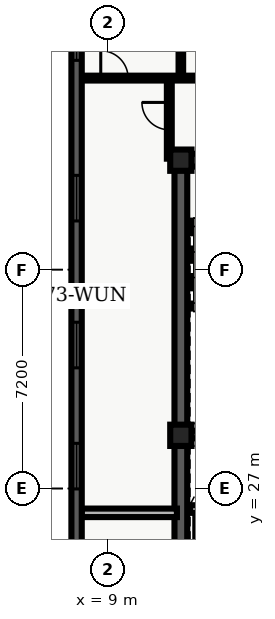
"""IFC4 building model, lengths in metres.
Left out: names, types, materials, properties, quantities, classifications, styles, units other than length and angle.
Written with IfcOpenShell. Run it as: python <this file> out.ifc"""

import sys

from ifc_helpers import new_model, entity, si_unit, converted_unit, direction, frame, origin_with_axes, origin_2d_with_axis, place, context, subcontext, project, spatial, polyline, rectangle, outline, extrude, element, fill, save


model = new_model("IFC4")
c1 = context("Model", 3, precision=1e-05, world=origin_with_axes(), true_north=direction((0.0, 1.0)))
c2 = subcontext(c1, "Body", "Model", "MODEL_VIEW")
j1 = project(units=[si_unit("LENGTHUNIT", "METRE"), converted_unit("PLANEANGLEUNIT", "DEGREE", entity("IfcPlaneAngleMeasure", 0.017), si_unit("PLANEANGLEUNIT", "RADIAN"), dimensions=[0, 0, 0, 0, 0, 0, 0])], contexts=[c1])
p1 = place(None, origin_with_axes())
s1 = spatial("IfcSite", under=j1, at=p1, CompositionType="ELEMENT")
p2 = place(p1, origin_with_axes())
s2 = spatial("IfcBuilding", under=s1, at=p2, CompositionType="ELEMENT")
p3 = place(p2, frame((0.0, 0.0, 295.8), z_axis=(0.0, 0.0, 1.0), x_axis=(1.0, 0.0, 0.0)))
s3 = spatial("IfcBuildingStorey", under=s2, at=p3, CompositionType="ELEMENT", Elevation=295.8)
p4 = place(p3, frame((11.4, 10.8, 0.0), z_axis=(0.0, 0.0, 1.0), x_axis=(0.0, 1.0, 0.0)))
e1 = element("IfcWall", 1, at=p4, inside=s3, PredefinedType="SHEAR", context=c2, shape_type="SweptSolid", body=[
    extrude(outline(polyline([(0.0, -0.21), (27.0, -0.21), (27.0, 0.21), (0.0, 0.21), (0.0, -0.21)])), origin_with_axes(), (0.0, 0.0, 1.0), 3.66),
])
p5 = place(p3, frame((11.4, 37.8, 0.0), z_axis=(0.0, 0.0, 1.0), x_axis=(1.0, 0.0, 0.0)))
e2 = element("IfcWall", 2, at=p5, inside=s3, PredefinedType="SHEAR", context=c2, shape_type="SweptSolid", body=[
    extrude(outline(polyline([(0.0, -0.21), (7.2, -0.21), (7.2, 0.21), (0.0, 0.21), (0.0, -0.21)])), origin_with_axes(), (0.0, 0.0, 1.0), 3.66),
])
p6 = place(p5, frame((2.625, 0.0, 0.0), z_axis=(0.0, 0.0, 1.0), x_axis=(1.0, 0.0, 0.0)))
e3 = element("IfcOpeningElement", 3, at=p6, cuts=e2, PredefinedType="OPENING", context=c2, shape_type="SweptSolid", body=[
    extrude(rectangle(XDim=1.05, YDim=0.44, at=origin_2d_with_axis()), origin_with_axes(), (0.0, 0.0, 1.0), 2.15),
])
p7 = place(p3, frame((11.61, 28.775, 0.0), z_axis=(0.0, 0.0, 1.0), x_axis=(1.0, 0.0, 0.0)))
e4 = element("IfcWall", 4, at=p7, inside=s3, PredefinedType="SHEAR", context=c2, shape_type="SweptSolid", body=[
    extrude(outline(polyline([(0.0, -0.125), (6.78, -0.125), (6.78, 0.125), (0.0, 0.125), (0.0, -0.125)])), origin_with_axes(), (0.0, 0.0, 1.0), 3.66),
])
p8 = place(p3, frame((11.7, 26.325, 0.0), z_axis=(0.0, 0.0, 1.0), x_axis=(1.0, 0.0, 0.0)))
e5 = element("IfcWall", 5, at=p8, inside=s3, PredefinedType="SOLIDWALL", context=c2, shape_type="SweptSolid", body=[
    extrude(outline(polyline([(0.0, -0.125), (6.6, -0.125), (6.6, 0.125), (0.0, 0.125), (0.0, -0.125)])), origin_with_axes(), (0.0, 0.0, 1.0), 2.7),
])
p9 = place(p8, frame((3.5, 0.0, 0.0), z_axis=(0.0, 0.0, 1.0), x_axis=(1.0, 0.0, 0.0)))
e6 = element("IfcOpeningElement", 6, at=p9, cuts=e5, PredefinedType="OPENING", context=c2, shape_type="SweptSolid", body=[
    extrude(rectangle(XDim=0.9, YDim=0.27, at=origin_2d_with_axis()), origin_with_axes(), (0.0, 0.0, 1.0), 2.15),
])
for number, where, z_axis, x_axis in (
    (7, (11.4, 28.75, 0.0), (0.0, 0.0, 1.0), (1.0, 0.0, 0.0)),
    (8, (11.4, 37.8, 0.0), (0.0, 0.0, 1.0), (1.0, 0.0, 0.0)),
):
    element("IfcColumn", number, at=place(p3, frame(where, z_axis=z_axis, x_axis=x_axis)), inside=s3, PredefinedType="COLUMN", context=c2, shape_type="SweptSolid", body=[
        extrude(rectangle(XDim=0.7, YDim=0.7, at=origin_2d_with_axis()), origin_with_axes(), (0.0, 0.0, 1.0), 3.9),
    ])
p10 = place(p3, frame((8.135, 40.5, 0.0), z_axis=(0.0, 0.0, 1.0), x_axis=(1.0, 0.0, 0.0)))
e9 = element("IfcWall", 9, at=p10, inside=s3, PredefinedType="PARTITIONING", context=c2, shape_type="SweptSolid", body=[
    extrude(outline(polyline([(0.0, -0.08), (22.715, -0.08), (22.715, 0.08), (0.0, 0.08), (0.0, -0.08)])), origin_with_axes(), (0.0, 0.0, 1.0), 2.7),
])
p11 = place(p10, frame((1.08, 0.0, 0.0), z_axis=(0.0, 0.0, 1.0), x_axis=(1.0, 0.0, 0.0)))
e10 = element("IfcOpeningElement", 10, at=p11, cuts=e9, PredefinedType="OPENING", context=c2, shape_type="SweptSolid", body=[
    extrude(rectangle(XDim=0.9, YDim=0.18, at=origin_2d_with_axis()), origin_with_axes(), (0.0, 0.0, 1.0), 2.15),
])
p12 = place(p10, frame((4.958, 0.0, 0.0), z_axis=(0.0, 0.0, 1.0), x_axis=(1.0, 0.0, 0.0)))
e11 = element("IfcOpeningElement", 11, at=p12, cuts=e9, PredefinedType="OPENING", context=c2, shape_type="SweptSolid", body=[
    extrude(rectangle(XDim=1.0, YDim=0.18, at=origin_2d_with_axis()), origin_with_axes(), (0.0, 0.0, 1.0), 2.15),
])
p13 = place(p10, frame((8.63, 0.0, 0.0), z_axis=(0.0, 0.0, 1.0), x_axis=(1.0, 0.0, 0.0)))
e12 = element("IfcOpeningElement", 12, at=p13, cuts=e9, PredefinedType="OPENING", context=c2, shape_type="SweptSolid", body=[
    extrude(rectangle(XDim=1.0, YDim=0.18, at=origin_2d_with_axis()), origin_with_axes(), (0.0, 0.0, 1.0), 2.15),
])
p14 = place(p10, frame((13.151, 0.0, 0.0), z_axis=(0.0, 0.0, 1.0), x_axis=(1.0, 0.0, 0.0)))
e13 = element("IfcOpeningElement", 13, at=p14, cuts=e9, PredefinedType="OPENING", context=c2, shape_type="SweptSolid", body=[
    extrude(rectangle(XDim=1.0, YDim=0.18, at=origin_2d_with_axis()), origin_with_axes(), (0.0, 0.0, 1.0), 2.15),
])
p15 = place(p3, frame((11.02, 37.85, 0.0), z_axis=(0.0, 0.0, 1.0), x_axis=(0.0, 1.0, 0.0)))
e14 = element("IfcWall", 14, at=p15, inside=s3, PredefinedType="PARTITIONING", context=c2, shape_type="SweptSolid", body=[
    extrude(outline(polyline([(0.0, -0.08), (2.65, -0.08), (2.65, 0.08), (0.0, 0.08), (0.0, -0.08)])), origin_with_axes(), (0.0, 0.0, 1.0), 2.7),
])
p16 = place(p15, frame((1.4, 0.0, 0.0), z_axis=(0.0, 0.0, 1.0), x_axis=(1.0, 0.0, 0.0)))
e15 = element("IfcOpeningElement", 15, at=p16, cuts=e14, PredefinedType="OPENING", context=c2, shape_type="SweptSolid", body=[
    extrude(rectangle(XDim=0.9, YDim=0.18, at=origin_2d_with_axis()), origin_with_axes(), (0.0, 0.0, 1.0), 2.15),
])
p17 = place(p3, frame((8.135, 26.2, 0.0), z_axis=(0.0, 0.0, 1.0), x_axis=(1.0, 0.0, 0.0)))
e16 = element("IfcWall", 16, at=p17, inside=s3, PredefinedType="PARTITIONING", context=c2, shape_type="SweptSolid", body=[
    extrude(outline(polyline([(0.0, -0.14), (3.135, -0.14), (3.135, 0.14), (0.0, 0.14), (0.0, -0.14)])), origin_with_axes(), (0.0, 0.0, 1.0), 2.7),
])
p18 = place(p3, frame((11.4, 40.6, 0.0), z_axis=(0.0, 0.0, 1.0), x_axis=(0.0, 1.0, 0.0)))
e17 = element("IfcWall", 17, at=p18, inside=s3, PredefinedType="PARTITIONING", context=c2, shape_type="SweptSolid", body=[
    extrude(outline(polyline([(0.0, -0.075), (5.865, -0.075), (5.865, 0.075), (0.0, 0.075), (0.0, -0.075)])), origin_with_axes(), (0.0, 0.0, 1.0), 2.7),
])
p19 = place(p3, frame((7.97, 4.54, 0.0), z_axis=(0.0, 0.0, 1.0), x_axis=(0.0, 1.0, 0.0)))
e18 = element("IfcWall", 18, at=p19, inside=s3, PredefinedType="SOLIDWALL", context=c2, shape_type="SweptSolid", body=[
    extrude(outline(polyline([(0.0, -0.17), (39.86, -0.17), (39.86, 0.17), (0.0, 0.17), (0.0, -0.17)])), origin_with_axes(), (0.0, 0.0, 1.0), 3.66),
])
p20 = place(p19, frame((7.849, 0.0, 0.45), z_axis=(0.0, 0.0, 1.0), x_axis=(1.0, 0.0, 0.0)))
e19 = element("IfcOpeningElement", 19, at=p20, cuts=e18, PredefinedType="OPENING", context=c2, shape_type="SweptSolid", body=[
    extrude(rectangle(XDim=1.5, YDim=0.36, at=origin_2d_with_axis()), origin_with_axes(), (0.0, 0.0, 1.0), 2.1),
])
p21 = place(p19, frame((12.681, 0.0, 0.45), z_axis=(0.0, 0.0, 1.0), x_axis=(1.0, 0.0, 0.0)))
e20 = element("IfcOpeningElement", 20, at=p21, cuts=e18, PredefinedType="OPENING", context=c2, shape_type="SweptSolid", body=[
    extrude(rectangle(XDim=1.5, YDim=0.36, at=origin_2d_with_axis()), origin_with_axes(), (0.0, 0.0, 1.0), 2.1),
])
p22 = place(p19, frame((17.514, 0.0, 0.45), z_axis=(0.0, 0.0, 1.0), x_axis=(1.0, 0.0, 0.0)))
e21 = element("IfcOpeningElement", 21, at=p22, cuts=e18, PredefinedType="OPENING", context=c2, shape_type="SweptSolid", body=[
    extrude(rectangle(XDim=1.5, YDim=0.36, at=origin_2d_with_axis()), origin_with_axes(), (0.0, 0.0, 1.0), 2.1),
])
p23 = place(p19, frame((23.196, 0.0, 0.45), z_axis=(0.0, 0.0, 1.0), x_axis=(1.0, 0.0, 0.0)))
e22 = element("IfcOpeningElement", 22, at=p23, cuts=e18, PredefinedType="OPENING", context=c2, shape_type="SweptSolid", body=[
    extrude(rectangle(XDim=1.5, YDim=0.36, at=origin_2d_with_axis()), origin_with_axes(), (0.0, 0.0, 1.0), 2.1),
])
p24 = place(p19, frame((27.179, 0.0, 0.45), z_axis=(0.0, 0.0, 1.0), x_axis=(1.0, 0.0, 0.0)))
e23 = element("IfcOpeningElement", 23, at=p24, cuts=e18, PredefinedType="OPENING", context=c2, shape_type="SweptSolid", body=[
    extrude(rectangle(XDim=1.5, YDim=0.36, at=origin_2d_with_axis()), origin_with_axes(), (0.0, 0.0, 1.0), 2.1),
])
p25 = place(p19, frame((32.011, 0.0, 0.45), z_axis=(0.0, 0.0, 1.0), x_axis=(1.0, 0.0, 0.0)))
e24 = element("IfcOpeningElement", 24, at=p25, cuts=e18, PredefinedType="OPENING", context=c2, shape_type="SweptSolid", body=[
    extrude(rectangle(XDim=1.5, YDim=0.36, at=origin_2d_with_axis()), origin_with_axes(), (0.0, 0.0, 1.0), 2.1),
])
p26 = place(p19, frame((37.294, 0.0, 0.45), z_axis=(0.0, 0.0, 1.0), x_axis=(1.0, 0.0, 0.0)))
e25 = element("IfcOpeningElement", 25, at=p26, cuts=e18, PredefinedType="OPENING", context=c2, shape_type="SweptSolid", body=[
    extrude(rectangle(XDim=1.5, YDim=0.36, at=origin_2d_with_axis()), origin_with_axes(), (0.0, 0.0, 1.0), 2.1),
])
p27 = place(p15, frame((1.4, 0.0, 0.0), z_axis=(0.0, 0.0, 1.0), x_axis=(1.0, 0.0, 0.0)))
e26 = element("IfcDoor", 26, at=p27, inside=s3, OperationType="SINGLE_SWING_RIGHT", PredefinedType="DOOR", context=c2, shape_type="SweptSolid", body=[
    extrude(rectangle(XDim=0.9, YDim=0.09, at=origin_2d_with_axis()), origin_with_axes(), (0.0, 0.0, 1.0), 2.15),
])
fill(e15, e26)
p28 = place(p10, frame((1.08, 0.0, 0.0), z_axis=(0.0, 0.0, 1.0), x_axis=(1.0, 0.0, 0.0)))
e27 = element("IfcDoor", 27, at=p28, inside=s3, OperationType="SINGLE_SWING_LEFT", PredefinedType="DOOR", context=c2, shape_type="SweptSolid", body=[
    extrude(rectangle(XDim=0.9, YDim=0.09, at=origin_2d_with_axis()), origin_with_axes(), (0.0, 0.0, 1.0), 2.15),
])
fill(e10, e27)
p29 = place(p19, frame((23.196, 0.0, 0.45), z_axis=(0.0, 0.0, 1.0), x_axis=(1.0, 0.0, 0.0)))
e28 = element("IfcWindow", 28, at=p29, inside=s3, PredefinedType="WINDOW", context=c2, shape_type="SweptSolid", body=[
    extrude(rectangle(XDim=1.5, YDim=0.09, at=origin_2d_with_axis()), origin_with_axes(), (0.0, 0.0, 1.0), 2.1),
])
fill(e22, e28)
p30 = place(p19, frame((27.179, 0.0, 0.45), z_axis=(0.0, 0.0, 1.0), x_axis=(1.0, 0.0, 0.0)))
e29 = element("IfcWindow", 29, at=p30, inside=s3, PredefinedType="WINDOW", context=c2, shape_type="SweptSolid", body=[
    extrude(rectangle(XDim=1.5, YDim=0.09, at=origin_2d_with_axis()), origin_with_axes(), (0.0, 0.0, 1.0), 2.1),
])
fill(e23, e29)
p31 = place(p19, frame((32.011, 0.0, 0.45), z_axis=(0.0, 0.0, 1.0), x_axis=(1.0, 0.0, 0.0)))
e30 = element("IfcWindow", 30, at=p31, inside=s3, PredefinedType="WINDOW", context=c2, shape_type="SweptSolid", body=[
    extrude(rectangle(XDim=1.5, YDim=0.09, at=origin_2d_with_axis()), origin_with_axes(), (0.0, 0.0, 1.0), 2.1),
])
fill(e24, e30)
p32 = place(p19, frame((37.294, 0.0, 0.45), z_axis=(0.0, 0.0, 1.0), x_axis=(1.0, 0.0, 0.0)))
e31 = element("IfcWindow", 31, at=p32, inside=s3, PredefinedType="WINDOW", context=c2, shape_type="SweptSolid", body=[
    extrude(rectangle(XDim=1.5, YDim=0.09, at=origin_2d_with_axis()), origin_with_axes(), (0.0, 0.0, 1.0), 2.1),
])
fill(e25, e31)
save(model, sys.argv[1])
